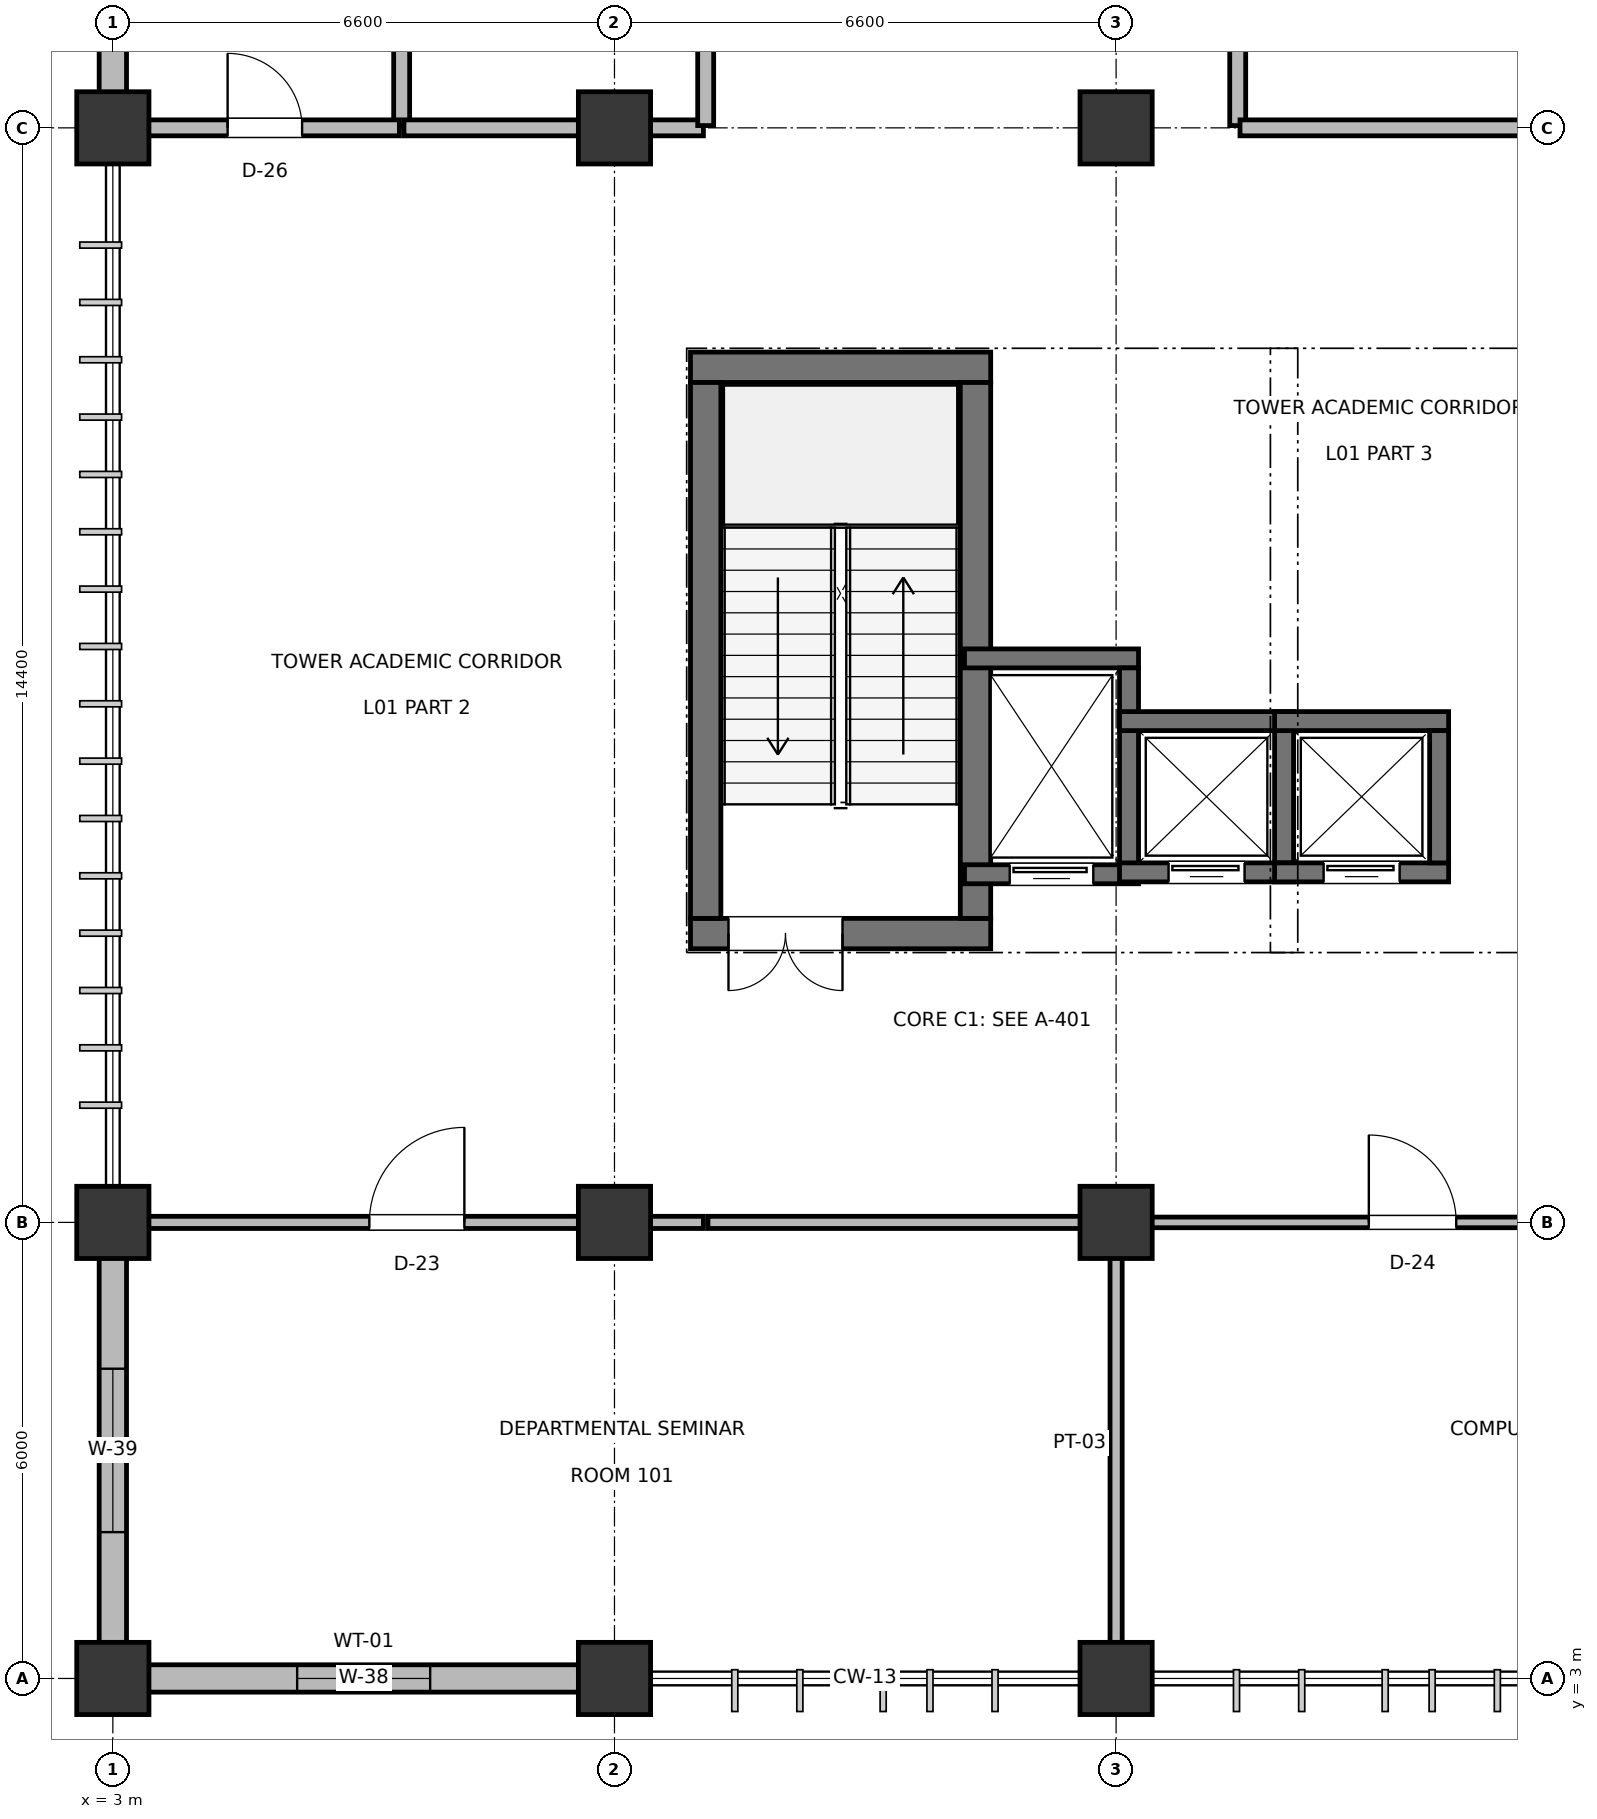
"""IFC4 building model, lengths in metres.
Left out: names, types, materials, properties, quantities, classifications, styles, units other than length and angle.
Written with IfcOpenShell. Run it as: python <this file> out.ifc"""

import sys

from ifc_helpers import new_model, si_unit, direction, frame, frame_2d, origin, origin_2d, place, context, subcontext, project, spatial, rectangle, extrude, element, fill, save


model = new_model("IFC4")
c1 = context("Model", 3, precision=1e-05, world=origin(), true_north=direction((0.0, 1.0)))
c2 = subcontext(c1, "Body", "Model", "MODEL_VIEW")
j1 = project(units=[si_unit("LENGTHUNIT", "METRE"), si_unit("PLANEANGLEUNIT", "RADIAN")], contexts=[c1])
p1 = place(None, origin())
s1 = spatial("IfcSite", under=j1, at=p1, CompositionType="ELEMENT")
p2 = place(p1, origin())
s2 = spatial("IfcBuilding", under=s1, at=p2, CompositionType="ELEMENT")
p3 = place(p2, frame((0.0, 0.0, 5.4)))
s3 = spatial("IfcBuildingStorey", under=s2, at=p3, CompositionType="ELEMENT", Elevation=5.4)
for number, where, z_axis, x_axis in (
    (1, (3.0, 3.0, 0.0), (0.0, 0.0, 1.0), (1.0, 0.0, 0.0)),
    (2, (3.0, 9.0, 0.0), (0.0, 0.0, 1.0), (1.0, 0.0, 0.0)),
    (3, (3.0, 23.4, 0.0), (0.0, 0.0, 1.0), (1.0, 0.0, 0.0)),
    (4, (9.6, 3.0, 0.0), (0.0, 0.0, 1.0), (1.0, 0.0, 0.0)),
    (5, (9.6, 9.0, 0.0), (0.0, 0.0, 1.0), (1.0, 0.0, 0.0)),
    (6, (9.6, 23.4, 0.0), (0.0, 0.0, 1.0), (1.0, 0.0, 0.0)),
    (7, (16.2, 3.0, 0.0), (0.0, 0.0, 1.0), (1.0, 0.0, 0.0)),
    (8, (16.2, 9.0, 0.0), (0.0, 0.0, 1.0), (1.0, 0.0, 0.0)),
    (9, (16.2, 23.4, 0.0), (0.0, 0.0, 1.0), (1.0, 0.0, 0.0)),
):
    element("IfcColumn", number, at=place(p3, frame(where, z_axis=z_axis, x_axis=x_axis)), inside=s3, PredefinedType="COLUMN", context=c2, shape_type="SweptSolid", body=[
        extrude(rectangle(XDim=0.95, YDim=0.95, at=origin_2d()), origin(), (0.0, 0.0, 1.0), 4.8),
    ])
p4 = place(p3, frame((3.465, 3.0, 0.0), z_axis=(0.0, 0.0, 1.0), x_axis=(1.0, 0.0, 0.0)))
e10 = element("IfcWall", 10, at=p4, inside=s3, PredefinedType="SOLIDWALL", context=c2, shape_type="SweptSolid", body=[
    extrude(rectangle(XDim=5.67, YDim=0.36, at=frame_2d((2.835, 0.0))), origin(), (0.0, 0.0, 1.0), 2.87),
])
p5 = place(p4, frame((1.96, 0.0, 0.9)))
e11 = element("IfcOpeningElement", 11, at=p5, cuts=e10, PredefinedType="OPENING", context=c2, shape_type="SweptSolid", body=[
    extrude(rectangle(XDim=1.75, YDim=1.6, at=frame_2d((0.875, 0.8))), frame((0.0, 0.19, 0.0), z_axis=(0.0, -1.0, 0.0), x_axis=(1.0, 0.0, 0.0)), (0.0, 0.0, 1.0), 0.38),
])
p6 = place(p3, frame((3.0, 3.465, 0.0), z_axis=(0.0, 0.0, 1.0), x_axis=(0.0, 1.0, 0.0)))
e12 = element("IfcWall", 12, at=p6, inside=s3, PredefinedType="SOLIDWALL", context=c2, shape_type="SweptSolid", body=[
    extrude(rectangle(XDim=5.07, YDim=0.36, at=frame_2d((2.535, 0.0))), origin(), (0.0, 0.0, 1.0), 3.875),
])
p7 = place(p6, frame((1.46, 0.0, 0.9)))
e13 = element("IfcOpeningElement", 13, at=p7, cuts=e12, PredefinedType="OPENING", context=c2, shape_type="SweptSolid", body=[
    extrude(rectangle(XDim=2.15, YDim=1.7, at=frame_2d((1.075, 0.85))), frame((0.0, 0.19, 0.0), z_axis=(0.0, -1.0, 0.0), x_axis=(1.0, 0.0, 0.0)), (0.0, 0.0, 1.0), 0.38),
])
p8 = place(p3, frame((3.0, 23.855, 0.0), z_axis=(0.0, 0.0, 1.0), x_axis=(0.0, 1.0, 0.0)))
e14 = element("IfcWall", 14, at=p8, inside=s3, PredefinedType="SOLIDWALL", context=c2, shape_type="SweptSolid", body=[
    extrude(rectangle(XDim=5.69, YDim=0.36, at=frame_2d((2.845, 0.0))), origin(), (0.0, 0.0, 1.0), 3.875),
])
p9 = place(p8, frame((1.62, 0.0, 0.9)))
e15 = element("IfcOpeningElement", 15, at=p9, cuts=e14, PredefinedType="OPENING", context=c2, shape_type="SweptSolid", body=[
    extrude(rectangle(XDim=2.45, YDim=1.8, at=frame_2d((1.225, 0.9))), frame((0.0, 0.19, 0.0), z_axis=(0.0, -1.0, 0.0), x_axis=(1.0, 0.0, 0.0)), (0.0, 0.0, 1.0), 0.38),
])
p10 = place(p3, frame((10.6, 12.8, 0.0), z_axis=(0.0, 0.0, 1.0), x_axis=(1.0, 0.0, 0.0)))
e16 = element("IfcWall", 16, at=p10, inside=s3, PredefinedType="SHEAR", context=c2, shape_type="SweptSolid", body=[
    extrude(rectangle(XDim=3.95, YDim=0.4, at=frame_2d((1.975, 0.0))), origin(), (0.0, 0.0, 1.0), 4.58),
])
p11 = place(p10, frame((0.5, 0.0, 0.0)))
e17 = element("IfcOpeningElement", 17, at=p11, cuts=e16, PredefinedType="OPENING", context=c2, shape_type="SweptSolid", body=[
    extrude(rectangle(XDim=1.5, YDim=2.2, at=frame_2d((0.75, 1.1))), frame((0.0, 0.21, 0.0), z_axis=(0.0, -1.0, 0.0), x_axis=(1.0, 0.0, 0.0)), (0.0, 0.0, 1.0), 0.42),
])
p12 = place(p3, frame((10.6, 20.25, 0.0), z_axis=(0.0, 0.0, 1.0), x_axis=(1.0, 0.0, 0.0)))
e18 = element("IfcWall", 18, at=p12, inside=s3, PredefinedType="SHEAR", context=c2, shape_type="SweptSolid", body=[
    extrude(rectangle(XDim=3.95, YDim=0.4, at=frame_2d((1.975, 0.0))), origin(), (0.0, 0.0, 1.0), 4.58),
])
for number, where, z_axis, x_axis in (
    (19, (10.8, 13.0, 0.0), (0.0, 0.0, 1.0), (0.0, 1.0, 0.0)),
    (20, (14.35, 13.0, 0.0), (0.0, 0.0, 1.0), (0.0, 1.0, 0.0)),
):
    element("IfcWall", number, at=place(p3, frame(where, z_axis=z_axis, x_axis=x_axis)), inside=s3, PredefinedType="SHEAR", context=c2, shape_type="SweptSolid", body=[
        extrude(rectangle(XDim=7.05, YDim=0.4, at=frame_2d((3.525, 0.0))), origin(), (0.0, 0.0, 1.0), 4.58),
    ])
p13 = place(p3, frame((14.205, 13.58, 0.0), z_axis=(0.0, 0.0, 1.0), x_axis=(1.0, 0.0, 0.0)))
e21 = element("IfcWall", 21, at=p13, inside=s3, PredefinedType="SHEAR", context=c2, shape_type="SweptSolid", body=[
    extrude(rectangle(XDim=2.29, YDim=0.25, at=frame_2d((1.145, 0.0))), origin(), (0.0, 0.0, 1.0), 4.56),
])
p14 = place(p13, frame((0.595, 0.0, 0.0)))
e22 = element("IfcOpeningElement", 22, at=p14, cuts=e21, PredefinedType="OPENING", context=c2, shape_type="SweptSolid", body=[
    extrude(rectangle(XDim=1.1, YDim=2.2, at=frame_2d((0.55, 1.1))), frame((0.0, 0.135, 0.0), z_axis=(0.0, -1.0, 0.0), x_axis=(1.0, 0.0, 0.0)), (0.0, 0.0, 1.0), 0.27),
])
p15 = place(p3, frame((14.205, 16.42, 0.0), z_axis=(0.0, 0.0, 1.0), x_axis=(1.0, 0.0, 0.0)))
e23 = element("IfcWall", 23, at=p15, inside=s3, PredefinedType="SHEAR", context=c2, shape_type="SweptSolid", body=[
    extrude(rectangle(XDim=2.29, YDim=0.25, at=frame_2d((1.145, 0.0))), origin(), (0.0, 0.0, 1.0), 4.56),
])
p16 = place(p3, frame((16.37, 13.705, 0.0), z_axis=(0.0, 0.0, 1.0), x_axis=(0.0, 1.0, 0.0)))
e24 = element("IfcWall", 24, at=p16, inside=s3, PredefinedType="SHEAR", context=c2, shape_type="SweptSolid", body=[
    extrude(rectangle(XDim=2.59, YDim=0.25, at=frame_2d((1.295, 0.0))), origin(), (0.0, 0.0, 1.0), 4.56),
])
p17 = place(p3, frame((16.245, 13.605, 0.0), z_axis=(0.0, 0.0, 1.0), x_axis=(1.0, 0.0, 0.0)))
e25 = element("IfcWall", 25, at=p17, inside=s3, PredefinedType="SHEAR", context=c2, shape_type="SweptSolid", body=[
    extrude(rectangle(XDim=2.29, YDim=0.25, at=frame_2d((1.145, 0.0))), origin(), (0.0, 0.0, 1.0), 4.56),
])
p18 = place(p17, frame((0.645, 0.0, 0.0)))
e26 = element("IfcOpeningElement", 26, at=p18, cuts=e25, PredefinedType="OPENING", context=c2, shape_type="SweptSolid", body=[
    extrude(rectangle(XDim=1.0, YDim=2.15, at=frame_2d((0.5, 1.075))), frame((0.0, 0.135, 0.0), z_axis=(0.0, -1.0, 0.0), x_axis=(1.0, 0.0, 0.0)), (0.0, 0.0, 1.0), 0.27),
])
p19 = place(p3, frame((16.245, 15.595, 0.0), z_axis=(0.0, 0.0, 1.0), x_axis=(1.0, 0.0, 0.0)))
e27 = element("IfcWall", 27, at=p19, inside=s3, PredefinedType="SHEAR", context=c2, shape_type="SweptSolid", body=[
    extrude(rectangle(XDim=2.29, YDim=0.25, at=frame_2d((1.145, 0.0))), origin(), (0.0, 0.0, 1.0), 4.56),
])
p20 = place(p3, frame((18.41, 13.73, 0.0), z_axis=(0.0, 0.0, 1.0), x_axis=(0.0, 1.0, 0.0)))
e28 = element("IfcWall", 28, at=p20, inside=s3, PredefinedType="SHEAR", context=c2, shape_type="SweptSolid", body=[
    extrude(rectangle(XDim=1.74, YDim=0.25, at=frame_2d((0.87, 0.0))), origin(), (0.0, 0.0, 1.0), 4.56),
])
p21 = place(p3, frame((18.285, 13.605, 0.0), z_axis=(0.0, 0.0, 1.0), x_axis=(1.0, 0.0, 0.0)))
e29 = element("IfcWall", 29, at=p21, inside=s3, PredefinedType="SHEAR", context=c2, shape_type="SweptSolid", body=[
    extrude(rectangle(XDim=2.29, YDim=0.25, at=frame_2d((1.145, 0.0))), origin(), (0.0, 0.0, 1.0), 4.56),
])
p22 = place(p21, frame((0.645, 0.0, 0.0)))
e30 = element("IfcOpeningElement", 30, at=p22, cuts=e29, PredefinedType="OPENING", context=c2, shape_type="SweptSolid", body=[
    extrude(rectangle(XDim=1.0, YDim=2.15, at=frame_2d((0.5, 1.075))), frame((0.0, 0.135, 0.0), z_axis=(0.0, -1.0, 0.0), x_axis=(1.0, 0.0, 0.0)), (0.0, 0.0, 1.0), 0.27),
])
p23 = place(p3, frame((18.285, 15.595, 0.0), z_axis=(0.0, 0.0, 1.0), x_axis=(1.0, 0.0, 0.0)))
e31 = element("IfcWall", 31, at=p23, inside=s3, PredefinedType="SHEAR", context=c2, shape_type="SweptSolid", body=[
    extrude(rectangle(XDim=2.29, YDim=0.25, at=frame_2d((1.145, 0.0))), origin(), (0.0, 0.0, 1.0), 4.56),
])
p24 = place(p3, frame((20.45, 13.73, 0.0), z_axis=(0.0, 0.0, 1.0), x_axis=(0.0, 1.0, 0.0)))
e32 = element("IfcWall", 32, at=p24, inside=s3, PredefinedType="SHEAR", context=c2, shape_type="SweptSolid", body=[
    extrude(rectangle(XDim=1.74, YDim=0.25, at=frame_2d((0.87, 0.0))), origin(), (0.0, 0.0, 1.0), 4.56),
])
p25 = place(p3, frame((16.2, 3.23, 0.0), z_axis=(0.0, 0.0, 1.0), x_axis=(0.0, 1.0, 0.0)))
e33 = element("IfcWall", 33, at=p25, inside=s3, PredefinedType="PARTITIONING", context=c2, shape_type="SweptSolid", body=[
    extrude(rectangle(XDim=5.74, YDim=0.16, at=frame_2d((2.87, 0.0))), origin(), (0.0, 0.0, 1.0), 3.925),
])
p26 = place(p3, frame((3.23, 9.0, 0.0), z_axis=(0.0, 0.0, 1.0), x_axis=(1.0, 0.0, 0.0)))
e34 = element("IfcWall", 34, at=p26, inside=s3, PredefinedType="PARTITIONING", context=c2, shape_type="SweptSolid", body=[
    extrude(rectangle(XDim=7.54, YDim=0.16, at=frame_2d((3.77, 0.0))), origin(), (0.0, 0.0, 1.0), 3.795),
])
p27 = place(p26, frame((3.145, 0.0, 0.0)))
e35 = element("IfcOpeningElement", 35, at=p27, cuts=e34, PredefinedType="OPENING", context=c2, shape_type="SweptSolid", body=[
    extrude(rectangle(XDim=1.25, YDim=2.2, at=frame_2d((0.625, 1.1))), frame((0.0, 0.09, 0.0), z_axis=(0.0, -1.0, 0.0), x_axis=(1.0, 0.0, 0.0)), (0.0, 0.0, 1.0), 0.18),
])
p28 = place(p3, frame((10.83, 9.0, 0.0), z_axis=(0.0, 0.0, 1.0), x_axis=(1.0, 0.0, 0.0)))
e36 = element("IfcWall", 36, at=p28, inside=s3, PredefinedType="PARTITIONING", context=c2, shape_type="SweptSolid", body=[
    extrude(rectangle(XDim=5.34, YDim=0.16, at=frame_2d((2.67, 0.0))), origin(), (0.0, 0.0, 1.0), 3.825),
])
p29 = place(p3, frame((16.23, 9.0, 0.0), z_axis=(0.0, 0.0, 1.0), x_axis=(1.0, 0.0, 0.0)))
e37 = element("IfcWall", 37, at=p29, inside=s3, PredefinedType="PARTITIONING", context=c2, shape_type="SweptSolid", body=[
    extrude(rectangle(XDim=7.74, YDim=0.14, at=frame_2d((3.87, 0.0))), origin(), (0.0, 0.0, 1.0), 3.755),
])
p30 = place(p29, frame((3.295, 0.0, 0.0)))
e38 = element("IfcOpeningElement", 38, at=p30, cuts=e37, PredefinedType="OPENING", context=c2, shape_type="SweptSolid", body=[
    extrude(rectangle(XDim=1.15, YDim=2.15, at=frame_2d((0.575, 1.075))), frame((0.0, 0.08, 0.0), z_axis=(0.0, -1.0, 0.0), x_axis=(1.0, 0.0, 0.0)), (0.0, 0.0, 1.0), 0.16),
])
p31 = place(p3, frame((6.8, 23.43, 0.0), z_axis=(0.0, 0.0, 1.0), x_axis=(0.0, 1.0, 0.0)))
e39 = element("IfcWall", 39, at=p31, inside=s3, PredefinedType="PLUMBINGWALL", context=c2, shape_type="SweptSolid", body=[
    extrude(rectangle(XDim=6.54, YDim=0.21, at=frame_2d((3.27, 0.0))), origin(), (0.0, 0.0, 1.0), 3.725),
])
p32 = place(p3, frame((3.23, 23.4, 0.0), z_axis=(0.0, 0.0, 1.0), x_axis=(1.0, 0.0, 0.0)))
e40 = element("IfcWall", 40, at=p32, inside=s3, PredefinedType="PLUMBINGWALL", context=c2, shape_type="SweptSolid", body=[
    extrude(rectangle(XDim=3.54, YDim=0.21, at=frame_2d((1.77, 0.0))), origin(), (0.0, 0.0, 1.0), 3.955),
])
p33 = place(p32, frame((1.28, 0.0, 0.0)))
e41 = element("IfcOpeningElement", 41, at=p33, cuts=e40, PredefinedType="OPENING", context=c2, shape_type="SweptSolid", body=[
    extrude(rectangle(XDim=0.98, YDim=2.1, at=frame_2d((0.49, 1.05))), frame((0.0, 0.115, 0.0), z_axis=(0.0, -1.0, 0.0), x_axis=(1.0, 0.0, 0.0)), (0.0, 0.0, 1.0), 0.23),
])
p34 = place(p3, frame((6.83, 23.4, 0.0), z_axis=(0.0, 0.0, 1.0), x_axis=(1.0, 0.0, 0.0)))
e42 = element("IfcWall", 42, at=p34, inside=s3, PredefinedType="PLUMBINGWALL", context=c2, shape_type="SweptSolid", body=[
    extrude(rectangle(XDim=3.94, YDim=0.21, at=frame_2d((1.97, 0.0))), origin(), (0.0, 0.0, 1.0), 3.825),
])
p35 = place(p3, frame((10.8, 23.43, 0.0), z_axis=(0.0, 0.0, 1.0), x_axis=(0.0, 1.0, 0.0)))
e43 = element("IfcWall", 43, at=p35, inside=s3, PredefinedType="PLUMBINGWALL", context=c2, shape_type="SweptSolid", body=[
    extrude(rectangle(XDim=6.54, YDim=0.21, at=frame_2d((3.27, 0.0))), origin(), (0.0, 0.0, 1.0), 3.695),
])
p36 = place(p35, frame((2.81, 0.0, 0.0)))
e44 = element("IfcOpeningElement", 44, at=p36, cuts=e43, PredefinedType="OPENING", context=c2, shape_type="SweptSolid", body=[
    extrude(rectangle(XDim=0.92, YDim=2.1, at=frame_2d((0.46, 1.05))), frame((0.0, 0.115, 0.0), z_axis=(0.0, -1.0, 0.0), x_axis=(1.0, 0.0, 0.0)), (0.0, 0.0, 1.0), 0.23),
])
p37 = place(p3, frame((17.8, 23.43, 0.0), z_axis=(0.0, 0.0, 1.0), x_axis=(0.0, 1.0, 0.0)))
e45 = element("IfcWall", 45, at=p37, inside=s3, PredefinedType="PLUMBINGWALL", context=c2, shape_type="SweptSolid", body=[
    extrude(rectangle(XDim=6.54, YDim=0.21, at=frame_2d((3.27, 0.0))), origin(), (0.0, 0.0, 1.0), 3.725),
])
p38 = place(p37, frame((2.81, 0.0, 0.0)))
e46 = element("IfcOpeningElement", 46, at=p38, cuts=e45, PredefinedType="OPENING", context=c2, shape_type="SweptSolid", body=[
    extrude(rectangle(XDim=0.92, YDim=2.1, at=frame_2d((0.46, 1.05))), frame((0.0, 0.115, 0.0), z_axis=(0.0, -1.0, 0.0), x_axis=(1.0, 0.0, 0.0)), (0.0, 0.0, 1.0), 0.23),
])
p39 = place(p3, frame((17.83, 23.4, 0.0), z_axis=(0.0, 0.0, 1.0), x_axis=(1.0, 0.0, 0.0)))
e47 = element("IfcWall", 47, at=p39, inside=s3, PredefinedType="PLUMBINGWALL", context=c2, shape_type="SweptSolid", body=[
    extrude(rectangle(XDim=6.14, YDim=0.21, at=frame_2d((3.07, 0.0))), origin(), (0.0, 0.0, 1.0), 3.825),
])
p40 = place(p5, frame((1.75, 0.0, 0.0), z_axis=(0.0, 0.0, 1.0), x_axis=(-1.0, 0.0, 0.0)))
e48 = element("IfcWindow", 48, at=p40, inside=s3, PartitioningType="DOUBLE_PANEL_VERTICAL", PredefinedType="WINDOW", context=c2, shape_type="SweptSolid", body=[
    extrude(rectangle(XDim=1.75, YDim=1.6, at=frame_2d((0.875, 0.8))), frame((0.0, 0.03, 0.0), z_axis=(0.0, -1.0, 0.0), x_axis=(1.0, 0.0, 0.0)), (0.0, 0.0, 1.0), 0.06),
])
fill(e11, e48)
p41 = place(p7, origin())
e49 = element("IfcWindow", 49, at=p41, inside=s3, PartitioningType="DOUBLE_PANEL_VERTICAL", PredefinedType="WINDOW", context=c2, shape_type="SweptSolid", body=[
    extrude(rectangle(XDim=2.15, YDim=1.7, at=frame_2d((1.075, 0.85))), frame((0.0, 0.03, 0.0), z_axis=(0.0, -1.0, 0.0), x_axis=(1.0, 0.0, 0.0)), (0.0, 0.0, 1.0), 0.06),
])
fill(e13, e49)
p42 = place(p11, frame((1.5, 0.0, 0.0), z_axis=(0.0, 0.0, 1.0), x_axis=(-1.0, 0.0, 0.0)))
e50 = element("IfcDoor", 50, at=p42, inside=s3, OperationType="DOUBLE_DOOR_SINGLE_SWING", PredefinedType="DOOR", context=c2, shape_type="SweptSolid", body=[
    extrude(rectangle(XDim=1.5, YDim=2.2, at=frame_2d((0.75, 1.1))), frame((0.0, 0.025, 0.0), z_axis=(0.0, -1.0, 0.0), x_axis=(1.0, 0.0, 0.0)), (0.0, 0.0, 1.0), 0.05),
])
fill(e17, e50)
p43 = place(p14, frame((1.1, 0.0, 0.0), z_axis=(0.0, 0.0, 1.0), x_axis=(-1.0, 0.0, 0.0)))
e51 = element("IfcDoor", 51, at=p43, inside=s3, OperationType="SLIDING_TO_LEFT", PredefinedType="DOOR", context=c2, shape_type="SweptSolid", body=[
    extrude(rectangle(XDim=1.1, YDim=2.2, at=frame_2d((0.55, 1.1))), frame((0.0, 0.025, 0.0), z_axis=(0.0, -1.0, 0.0), x_axis=(1.0, 0.0, 0.0)), (0.0, 0.0, 1.0), 0.05),
])
fill(e22, e51)
p44 = place(p18, frame((1.0, 0.0, 0.0), z_axis=(0.0, 0.0, 1.0), x_axis=(-1.0, 0.0, 0.0)))
e52 = element("IfcDoor", 52, at=p44, inside=s3, OperationType="SLIDING_TO_LEFT", PredefinedType="DOOR", context=c2, shape_type="SweptSolid", body=[
    extrude(rectangle(XDim=1.0, YDim=2.15, at=frame_2d((0.5, 1.075))), frame((0.0, 0.025, 0.0), z_axis=(0.0, -1.0, 0.0), x_axis=(1.0, 0.0, 0.0)), (0.0, 0.0, 1.0), 0.05),
])
fill(e26, e52)
p45 = place(p22, frame((1.0, 0.0, 0.0), z_axis=(0.0, 0.0, 1.0), x_axis=(-1.0, 0.0, 0.0)))
e53 = element("IfcDoor", 53, at=p45, inside=s3, OperationType="SLIDING_TO_LEFT", PredefinedType="DOOR", context=c2, shape_type="SweptSolid", body=[
    extrude(rectangle(XDim=1.0, YDim=2.15, at=frame_2d((0.5, 1.075))), frame((0.0, 0.025, 0.0), z_axis=(0.0, -1.0, 0.0), x_axis=(1.0, 0.0, 0.0)), (0.0, 0.0, 1.0), 0.05),
])
fill(e30, e53)
p46 = place(p27, origin())
e54 = element("IfcDoor", 54, at=p46, inside=s3, OperationType="SINGLE_SWING_RIGHT", PredefinedType="DOOR", context=c2, shape_type="SweptSolid", body=[
    extrude(rectangle(XDim=1.25, YDim=2.2, at=frame_2d((0.625, 1.1))), frame((0.0, 0.025, 0.0), z_axis=(0.0, -1.0, 0.0), x_axis=(1.0, 0.0, 0.0)), (0.0, 0.0, 1.0), 0.05),
])
fill(e35, e54)
p47 = place(p30, origin())
e55 = element("IfcDoor", 55, at=p47, inside=s3, OperationType="SINGLE_SWING_LEFT", PredefinedType="DOOR", context=c2, shape_type="SweptSolid", body=[
    extrude(rectangle(XDim=1.15, YDim=2.15, at=frame_2d((0.575, 1.075))), frame((0.0, 0.025, 0.0), z_axis=(0.0, -1.0, 0.0), x_axis=(1.0, 0.0, 0.0)), (0.0, 0.0, 1.0), 0.05),
])
fill(e38, e55)
p48 = place(p33, origin())
e56 = element("IfcDoor", 56, at=p48, inside=s3, OperationType="SINGLE_SWING_LEFT", PredefinedType="DOOR", context=c2, shape_type="SweptSolid", body=[
    extrude(rectangle(XDim=0.98, YDim=2.1, at=frame_2d((0.49, 1.05))), frame((0.0, 0.025, 0.0), z_axis=(0.0, -1.0, 0.0), x_axis=(1.0, 0.0, 0.0)), (0.0, 0.0, 1.0), 0.05),
])
fill(e41, e56)
save(model, sys.argv[1])
